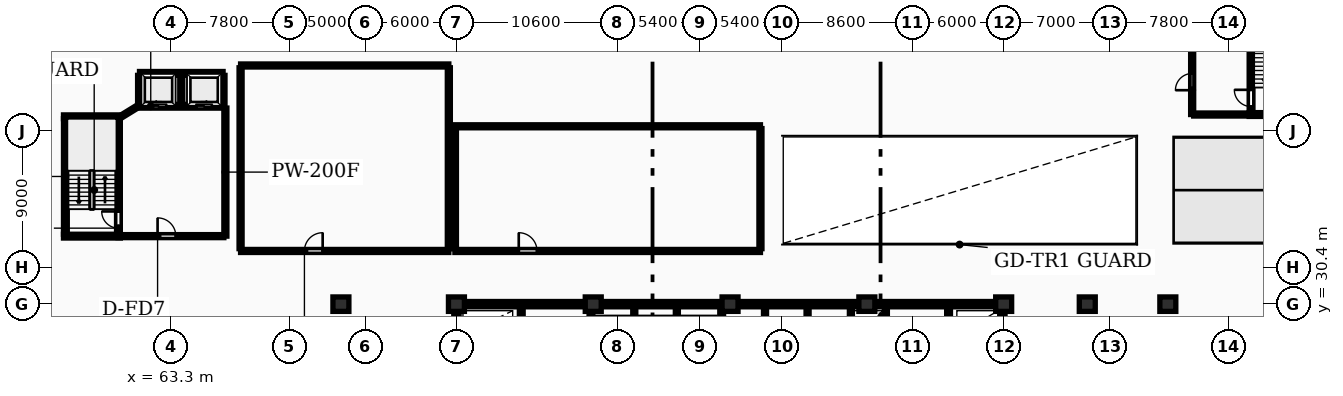
"""IFC4 building model, lengths in metres.
Left out: names, types, materials, properties, quantities, classifications, styles, units other than length and angle.
Written with IfcOpenShell. Run it as: python <this file> out.ifc"""

import sys

from ifc_helpers import new_model, si_unit, direction, frame, frame_2d, origin, origin_2d, place, context, subcontext, project, spatial, rectangle, extrude, element, fill, save


model = new_model("IFC4")
c1 = context("Model", 3, precision=1e-05, world=origin(), true_north=direction((0.0, 1.0)))
c2 = subcontext(c1, "Body", "Model", "MODEL_VIEW")
j1 = project(units=[si_unit("LENGTHUNIT", "METRE"), si_unit("PLANEANGLEUNIT", "RADIAN")], contexts=[c1])
p1 = place(None, origin())
s1 = spatial("IfcSite", under=j1, at=p1, CompositionType="ELEMENT")
p2 = place(p1, origin())
s2 = spatial("IfcBuilding", under=s1, at=p2, CompositionType="ELEMENT")
p3 = place(p2, frame((0.0, 0.0, -3.6)))
s3 = spatial("IfcBuildingStorey", under=s2, at=p3, CompositionType="ELEMENT", Elevation=-3.6)
for number, where, z_axis, x_axis in (
    (1, (74.5, 30.4, 0.0), (0.0, 0.0, 1.0), (1.0, 0.0, 0.0)),
    (2, (82.1, 30.4, 0.0), (0.0, 0.0, 1.0), (1.0, 0.0, 0.0)),
    (3, (91.1, 30.4, 0.0), (0.0, 0.0, 1.0), (1.0, 0.0, 0.0)),
    (4, (100.1, 30.4, 0.0), (0.0, 0.0, 1.0), (1.0, 0.0, 0.0)),
    (5, (109.1, 30.4, 0.0), (0.0, 0.0, 1.0), (1.0, 0.0, 0.0)),
    (6, (118.1, 30.4, 0.0), (0.0, 0.0, 1.0), (1.0, 0.0, 0.0)),
    (7, (123.6, 30.4, 0.0), (0.0, 0.0, 1.0), (1.0, 0.0, 0.0)),
    (8, (128.9, 30.4, 0.0), (0.0, 0.0, 1.0), (1.0, 0.0, 0.0)),
):
    element("IfcColumn", number, at=place(p3, frame(where, z_axis=z_axis, x_axis=x_axis)), inside=s3, PredefinedType="COLUMN", context=c2, shape_type="SweptSolid", body=[
        extrude(rectangle(XDim=1.05, YDim=0.95, at=origin_2d()), origin(), (0.0, 0.0, 1.0), 3.6),
    ])
p4 = place(p3, frame((81.925, 30.4, 0.0), z_axis=(0.0, 0.0, 1.0), x_axis=(1.0, 0.0, 0.0)))
e9 = element("IfcWall", 9, at=p4, inside=s3, PredefinedType="SHEAR", context=c2, shape_type="SweptSolid", body=[
    extrude(rectangle(XDim=36.265, YDim=0.35, at=frame_2d((18.132, 0.0))), origin(), (0.0, 0.0, 1.0), 3.6),
])
for number, where, z_axis, x_axis in (
    (10, (82.1, 18.575, 0.0), (0.0, 0.0, 1.0), (0.0, 1.0, 0.0)),
    (11, (118.015, 18.575, 0.0), (0.0, 0.0, 1.0), (0.0, 1.0, 0.0)),
):
    element("IfcWall", number, at=place(p3, frame(where, z_axis=z_axis, x_axis=x_axis)), inside=s3, PredefinedType="SHEAR", context=c2, shape_type="SweptSolid", body=[
        extrude(rectangle(XDim=11.65, YDim=0.35, at=frame_2d((5.825, 0.0))), origin(), (0.0, 0.0, 1.0), 3.6),
    ])
p5 = place(p3, frame((86.365, 18.6, 0.0), z_axis=(0.0, 0.0, 1.0), x_axis=(0.0, 1.0, 0.0)))
e12 = element("IfcWall", 12, at=p5, inside=s3, PredefinedType="SHEAR", context=c2, shape_type="SweptSolid", body=[
    extrude(rectangle(XDim=11.6, YDim=0.25, at=frame_2d((5.8, 0.0))), origin(), (0.0, 0.0, 1.0), 3.6),
])
p6 = place(p5, frame((0.45, 0.0, 0.0)))
e13 = element("IfcOpeningElement", 13, at=p6, cuts=e12, PredefinedType="OPENING", context=c2, shape_type="SweptSolid", body=[
    extrude(rectangle(XDim=0.85, YDim=2.05, at=frame_2d((0.425, 1.025))), frame((0.0, 0.135, 0.0), z_axis=(0.0, -1.0, 0.0), x_axis=(1.0, 0.0, 0.0)), (0.0, 0.0, 1.0), 0.27),
])
p7 = place(p5, frame((2.05, 0.0, 0.0)))
e14 = element("IfcOpeningElement", 14, at=p7, cuts=e12, PredefinedType="OPENING", context=c2, shape_type="SweptSolid", body=[
    extrude(rectangle(XDim=1.1, YDim=2.1, at=frame_2d((0.55, 1.05))), frame((0.0, 0.135, 0.0), z_axis=(0.0, -1.0, 0.0), x_axis=(1.0, 0.0, 0.0)), (0.0, 0.0, 1.0), 0.27),
])
p8 = place(p5, frame((9.95, 0.0, 0.0)))
e15 = element("IfcOpeningElement", 15, at=p8, cuts=e12, PredefinedType="OPENING", context=c2, shape_type="SweptSolid", body=[
    extrude(rectangle(XDim=0.85, YDim=2.05, at=frame_2d((0.425, 1.025))), frame((0.0, 0.135, 0.0), z_axis=(0.0, -1.0, 0.0), x_axis=(1.0, 0.0, 0.0)), (0.0, 0.0, 1.0), 0.27),
])
p9 = place(p3, frame((90.95, 18.6, 0.0), z_axis=(0.0, 0.0, 1.0), x_axis=(0.0, 1.0, 0.0)))
e16 = element("IfcWall", 16, at=p9, inside=s3, PredefinedType="SHEAR", context=c2, shape_type="SweptSolid", body=[
    extrude(rectangle(XDim=11.6, YDim=0.25, at=frame_2d((5.8, 0.0))), origin(), (0.0, 0.0, 1.0), 3.6),
])
p10 = place(p9, frame((4.6, 0.0, 0.0)))
e17 = element("IfcOpeningElement", 17, at=p10, cuts=e16, PredefinedType="OPENING", context=c2, shape_type="SweptSolid", body=[
    extrude(rectangle(XDim=1.1, YDim=2.1, at=frame_2d((0.55, 1.05))), frame((0.0, 0.135, 0.0), z_axis=(0.0, -1.0, 0.0), x_axis=(1.0, 0.0, 0.0)), (0.0, 0.0, 1.0), 0.27),
])
for number, where, z_axis, x_axis in (
    (18, (93.8, 27.38, 0.0), (0.0, 0.0, 1.0), (0.0, 1.0, 0.0)),
    (19, (96.6, 27.38, 0.0), (0.0, 0.0, 1.0), (0.0, 1.0, 0.0)),
):
    element("IfcWall", number, at=place(p3, frame(where, z_axis=z_axis, x_axis=x_axis)), inside=s3, PredefinedType="PARTITIONING", context=c2, shape_type="SweptSolid", body=[
        extrude(rectangle(XDim=2.82, YDim=0.2, at=frame_2d((1.41, 0.0))), origin(), (0.0, 0.0, 1.0), 3.3),
    ])
p11 = place(p3, frame((99.55, 27.25, 0.0), z_axis=(0.0, 0.0, 1.0), x_axis=(0.0, 1.0, 0.0)))
e20 = element("IfcWall", 20, at=p11, inside=s3, PredefinedType="SHEAR", context=c2, shape_type="SweptSolid", body=[
    extrude(rectangle(XDim=2.95, YDim=0.25, at=frame_2d((1.475, 0.0))), origin(), (0.0, 0.0, 1.0), 3.6),
])
for number, where, z_axis, x_axis in (
    (21, (102.4, 27.38, 0.0), (0.0, 0.0, 1.0), (0.0, 1.0, 0.0)),
    (22, (105.2, 27.38, 0.0), (0.0, 0.0, 1.0), (0.0, 1.0, 0.0)),
    (23, (108.05, 27.38, 0.0), (0.0, 0.0, 1.0), (0.0, 1.0, 0.0)),
):
    element("IfcWall", number, at=place(p3, frame(where, z_axis=z_axis, x_axis=x_axis)), inside=s3, PredefinedType="PARTITIONING", context=c2, shape_type="SweptSolid", body=[
        extrude(rectangle(XDim=2.82, YDim=0.2, at=frame_2d((1.41, 0.0))), origin(), (0.0, 0.0, 1.0), 3.3),
    ])
p12 = place(p3, frame((110.35, 18.6, 0.0), z_axis=(0.0, 0.0, 1.0), x_axis=(0.0, 1.0, 0.0)))
e24 = element("IfcWall", 24, at=p12, inside=s3, PredefinedType="PARTITIONING", context=c2, shape_type="SweptSolid", body=[
    extrude(rectangle(XDim=11.6, YDim=0.2, at=frame_2d((5.8, 0.0))), origin(), (0.0, 0.0, 1.0), 3.3),
])
p13 = place(p12, frame((5.2, 0.0, 0.0)))
e25 = element("IfcOpeningElement", 25, at=p13, cuts=e24, PredefinedType="OPENING", context=c2, shape_type="SweptSolid", body=[
    extrude(rectangle(XDim=1.1, YDim=2.15, at=frame_2d((0.55, 1.075))), frame((0.0, 0.11, 0.0), z_axis=(0.0, -1.0, 0.0), x_axis=(1.0, 0.0, 0.0)), (0.0, 0.0, 1.0), 0.22),
])
p14 = place(p3, frame((114.475, 18.6, 0.0), z_axis=(0.0, 0.0, 1.0), x_axis=(0.0, 1.0, 0.0)))
e26 = element("IfcWall", 26, at=p14, inside=s3, PredefinedType="SHEAR", context=c2, shape_type="SweptSolid", body=[
    extrude(rectangle(XDim=11.6, YDim=0.25, at=frame_2d((5.8, 0.0))), origin(), (0.0, 0.0, 1.0), 3.6),
])
p15 = place(p14, frame((0.45, 0.0, 0.0)))
e27 = element("IfcOpeningElement", 27, at=p15, cuts=e26, PredefinedType="OPENING", context=c2, shape_type="SweptSolid", body=[
    extrude(rectangle(XDim=0.85, YDim=2.05, at=frame_2d((0.425, 1.025))), frame((0.0, 0.135, 0.0), z_axis=(0.0, -1.0, 0.0), x_axis=(1.0, 0.0, 0.0)), (0.0, 0.0, 1.0), 0.27),
])
p16 = place(p14, frame((2.05, 0.0, 0.0)))
e28 = element("IfcOpeningElement", 28, at=p16, cuts=e26, PredefinedType="OPENING", context=c2, shape_type="SweptSolid", body=[
    extrude(rectangle(XDim=1.1, YDim=2.1, at=frame_2d((0.55, 1.05))), frame((0.0, 0.135, 0.0), z_axis=(0.0, -1.0, 0.0), x_axis=(1.0, 0.0, 0.0)), (0.0, 0.0, 1.0), 0.27),
])
p17 = place(p14, frame((9.95, 0.0, 0.0)))
e29 = element("IfcOpeningElement", 29, at=p17, cuts=e26, PredefinedType="OPENING", context=c2, shape_type="SweptSolid", body=[
    extrude(rectangle(XDim=0.85, YDim=2.05, at=frame_2d((0.425, 1.025))), frame((0.0, 0.135, 0.0), z_axis=(0.0, -1.0, 0.0), x_axis=(1.0, 0.0, 0.0)), (0.0, 0.0, 1.0), 0.27),
])
p18 = place(p3, frame((56.375, 35.0, 0.0), z_axis=(0.0, 0.0, 1.0), x_axis=(0.0, 1.0, 0.0)))
e30 = element("IfcWall", 30, at=p18, inside=s3, PredefinedType="SHEAR", context=c2, shape_type="SweptSolid", body=[
    extrude(rectangle(XDim=7.6, YDim=0.25, at=frame_2d((3.8, 0.0))), origin(), (0.0, 0.0, 1.0), 3.6),
])
for number, where, z_axis, x_axis in (
    (31, (56.25, 42.725, 0.0), (0.0, 0.0, 1.0), (1.0, 0.0, 0.0)),
    (32, (56.25, 34.875, 0.0), (0.0, 0.0, 1.0), (1.0, 0.0, 0.0)),
):
    element("IfcWall", number, at=place(p3, frame(where, z_axis=z_axis, x_axis=x_axis)), inside=s3, PredefinedType="SHEAR", context=c2, shape_type="SweptSolid", body=[
        extrude(rectangle(XDim=3.74, YDim=0.25, at=frame_2d((1.87, 0.0))), origin(), (0.0, 0.0, 1.0), 3.6),
    ])
p19 = place(p3, frame((59.865, 35.0, 0.0), z_axis=(0.0, 0.0, 1.0), x_axis=(0.0, 1.0, 0.0)))
e33 = element("IfcWall", 33, at=p19, inside=s3, PredefinedType="SHEAR", context=c2, shape_type="SweptSolid", body=[
    extrude(rectangle(XDim=7.6, YDim=0.25, at=frame_2d((3.8, 0.0))), origin(), (0.0, 0.0, 1.0), 3.6),
])
p20 = place(p19, frame((0.4, 0.0, 0.0)))
e34 = element("IfcOpeningElement", 34, at=p20, cuts=e33, PredefinedType="OPENING", context=c2, shape_type="SweptSolid", body=[
    extrude(rectangle(XDim=1.1, YDim=2.1, at=frame_2d((0.55, 1.05))), frame((0.0, 0.135, 0.0), z_axis=(0.0, -1.0, 0.0), x_axis=(1.0, 0.0, 0.0)), (0.0, 0.0, 1.0), 0.27),
])
p21 = place(p3, frame((61.25, 43.42, 0.0), z_axis=(0.0, 0.0, 1.0), x_axis=(1.0, 0.0, 0.0)))
e35 = element("IfcWall", 35, at=p21, inside=s3, PredefinedType="SHEAR", context=c2, shape_type="SweptSolid", body=[
    extrude(rectangle(XDim=5.5, YDim=0.25, at=frame_2d((2.75, 0.0))), origin(), (0.0, 0.0, 1.0), 3.6),
])
p22 = place(p21, frame((0.74, 0.0, 0.0)))
e36 = element("IfcOpeningElement", 36, at=p22, cuts=e35, PredefinedType="OPENING", context=c2, shape_type="SweptSolid", body=[
    extrude(rectangle(XDim=1.02, YDim=2.12, at=frame_2d((0.51, 1.06))), frame((0.0, 0.135, 0.0), z_axis=(0.0, -1.0, 0.0), x_axis=(1.0, 0.0, 0.0)), (0.0, 0.0, 1.0), 0.27),
])
p23 = place(p21, frame((3.74, 0.0, 0.0)))
e37 = element("IfcOpeningElement", 37, at=p23, cuts=e35, PredefinedType="OPENING", context=c2, shape_type="SweptSolid", body=[
    extrude(rectangle(XDim=1.02, YDim=2.12, at=frame_2d((0.51, 1.06))), frame((0.0, 0.135, 0.0), z_axis=(0.0, -1.0, 0.0), x_axis=(1.0, 0.0, 0.0)), (0.0, 0.0, 1.0), 0.27),
])
p24 = place(p3, frame((61.25, 45.58, 0.0), z_axis=(0.0, 0.0, 1.0), x_axis=(1.0, 0.0, 0.0)))
e38 = element("IfcWall", 38, at=p24, inside=s3, PredefinedType="SHEAR", context=c2, shape_type="SweptSolid", body=[
    extrude(rectangle(XDim=5.5, YDim=0.25, at=frame_2d((2.75, 0.0))), origin(), (0.0, 0.0, 1.0), 3.6),
])
for number, where, z_axis, x_axis in (
    (39, (61.25, 43.55, 0.0), (0.0, 0.0, 1.0), (0.0, 1.0, 0.0)),
    (40, (66.75, 43.55, 0.0), (0.0, 0.0, 1.0), (0.0, 1.0, 0.0)),
):
    element("IfcWall", number, at=place(p3, frame(where, z_axis=z_axis, x_axis=x_axis)), inside=s3, PredefinedType="SHEAR", context=c2, shape_type="SweptSolid", body=[
        extrude(rectangle(XDim=1.9, YDim=0.25, at=frame_2d((0.95, 0.0))), origin(), (0.0, 0.0, 1.0), 3.6),
    ])
p25 = place(p3, frame((64.0, 43.55, 0.0), z_axis=(0.0, 0.0, 1.0), x_axis=(0.0, 1.0, 0.0)))
e41 = element("IfcWall", 41, at=p25, inside=s3, PredefinedType="PARTITIONING", context=c2, shape_type="SweptSolid", body=[
    extrude(rectangle(XDim=1.9, YDim=0.2, at=frame_2d((0.95, 0.0))), origin(), (0.0, 0.0, 1.0), 3.3),
])
p26 = place(p3, frame((59.84, 34.875, 0.0), z_axis=(0.0, 0.0, 1.0), x_axis=(1.0, 0.0, 0.0)))
e42 = element("IfcWall", 42, at=p26, inside=s3, PredefinedType="PARTITIONING", context=c2, shape_type="SweptSolid", body=[
    extrude(rectangle(XDim=6.96, YDim=0.2, at=frame_2d((3.48, 0.0))), origin(), (0.0, 0.0, 1.0), 3.3),
])
p27 = place(p26, frame((2.6, 0.0, 0.0)))
e43 = element("IfcOpeningElement", 43, at=p27, cuts=e42, PredefinedType="OPENING", context=c2, shape_type="SweptSolid", body=[
    extrude(rectangle(XDim=1.2, YDim=2.18, at=frame_2d((0.6, 1.09))), frame((0.0, 0.11, 0.0), z_axis=(0.0, -1.0, 0.0), x_axis=(1.0, 0.0, 0.0)), (0.0, 0.0, 1.0), 0.22),
])
p28 = place(p3, frame((66.9, 34.875, 0.0), z_axis=(0.0, 0.0, 1.0), x_axis=(0.0, 1.0, 0.0)))
e44 = element("IfcWall", 44, at=p28, inside=s3, PredefinedType="PARTITIONING", context=c2, shape_type="SweptSolid", body=[
    extrude(rectangle(XDim=8.425, YDim=0.2, at=frame_2d((4.212, 0.0))), origin(), (0.0, 0.0, 1.0), 3.3),
])
p29 = place(p3, frame((60.02, 42.725, 0.0), z_axis=(0.0, 0.0, 1.0), x_axis=(0.851822584555, 0.523830396638, 0.0)))
e45 = element("IfcWall", 45, at=p29, inside=s3, PredefinedType="PARTITIONING", context=c2, shape_type="SweptSolid", body=[
    extrude(rectangle(XDim=1.326, YDim=0.2, at=frame_2d((0.663, 0.0))), origin(), (0.0, 0.0, 1.0), 3.3),
])
p30 = place(p3, frame((134.375, 43.0, 0.0), z_axis=(0.0, 0.0, 1.0), x_axis=(0.0, 1.0, 0.0)))
e46 = element("IfcWall", 46, at=p30, inside=s3, PredefinedType="SHEAR", context=c2, shape_type="SweptSolid", body=[
    extrude(rectangle(XDim=7.6, YDim=0.25, at=frame_2d((3.8, 0.0))), origin(), (0.0, 0.0, 1.0), 3.6),
])
p31 = place(p30, frame((0.4, 0.0, 0.0)))
e47 = element("IfcOpeningElement", 47, at=p31, cuts=e46, PredefinedType="OPENING", context=c2, shape_type="SweptSolid", body=[
    extrude(rectangle(XDim=1.1, YDim=2.1, at=frame_2d((0.55, 1.05))), frame((0.0, 0.135, 0.0), z_axis=(0.0, -1.0, 0.0), x_axis=(1.0, 0.0, 0.0)), (0.0, 0.0, 1.0), 0.27),
])
p32 = place(p3, frame((134.25, 42.875, 0.0), z_axis=(0.0, 0.0, 1.0), x_axis=(1.0, 0.0, 0.0)))
e48 = element("IfcWall", 48, at=p32, inside=s3, PredefinedType="SHEAR", context=c2, shape_type="SweptSolid", body=[
    extrude(rectangle(XDim=3.74, YDim=0.25, at=frame_2d((1.87, 0.0))), origin(), (0.0, 0.0, 1.0), 3.6),
])
p33 = place(p3, frame((130.5, 42.875, 0.0), z_axis=(0.0, 0.0, 1.0), x_axis=(0.0, 1.0, 0.0)))
e49 = element("IfcWall", 49, at=p33, inside=s3, PredefinedType="PARTITIONING", context=c2, shape_type="SweptSolid", body=[
    extrude(rectangle(XDim=4.825, YDim=0.2, at=frame_2d((2.413, 0.0))), origin(), (0.0, 0.0, 1.0), 3.3),
])
p34 = place(p33, frame((1.6, 0.0, 0.0)))
e50 = element("IfcOpeningElement", 50, at=p34, cuts=e49, PredefinedType="OPENING", context=c2, shape_type="SweptSolid", body=[
    extrude(rectangle(XDim=1.1, YDim=2.15, at=frame_2d((0.55, 1.075))), frame((0.0, 0.11, 0.0), z_axis=(0.0, -1.0, 0.0), x_axis=(1.0, 0.0, 0.0)), (0.0, 0.0, 1.0), 0.22),
])
p35 = place(p3, frame((130.6, 42.875, 0.0), z_axis=(0.0, 0.0, 1.0), x_axis=(1.0, 0.0, 0.0)))
e51 = element("IfcWall", 51, at=p35, inside=s3, PredefinedType="PARTITIONING", context=c2, shape_type="SweptSolid", body=[
    extrude(rectangle(XDim=3.65, YDim=0.2, at=frame_2d((1.825, 0.0))), origin(), (0.0, 0.0, 1.0), 3.3),
])
p36 = place(p3, frame((67.9, 33.9, 0.0), z_axis=(0.0, 0.0, 1.0), x_axis=(1.0, 0.0, 0.0)))
e52 = element("IfcWall", 52, at=p36, inside=s3, PredefinedType="PARTITIONING", context=c2, shape_type="SweptSolid", body=[
    extrude(rectangle(XDim=13.7, YDim=0.2, at=frame_2d((6.85, 0.0))), origin(), (0.0, 0.0, 1.0), 3.3),
])
p37 = place(p36, frame((4.2, 0.0, 0.0)))
e53 = element("IfcOpeningElement", 53, at=p37, cuts=e52, PredefinedType="OPENING", context=c2, shape_type="SweptSolid", body=[
    extrude(rectangle(XDim=1.2, YDim=2.15, at=frame_2d((0.6, 1.075))), frame((0.0, 0.11, 0.0), z_axis=(0.0, -1.0, 0.0), x_axis=(1.0, 0.0, 0.0)), (0.0, 0.0, 1.0), 0.22),
])
p38 = place(p3, frame((67.9, 46.1, 0.0), z_axis=(0.0, 0.0, 1.0), x_axis=(1.0, 0.0, 0.0)))
e54 = element("IfcWall", 54, at=p38, inside=s3, PredefinedType="PARTITIONING", context=c2, shape_type="SweptSolid", body=[
    extrude(rectangle(XDim=13.7, YDim=0.2, at=frame_2d((6.85, 0.0))), origin(), (0.0, 0.0, 1.0), 3.3),
])
for number, where, z_axis, x_axis in (
    (55, (67.9, 34.05, 0.0), (0.0, 0.0, 1.0), (0.0, 1.0, 0.0)),
    (56, (81.6, 34.05, 0.0), (0.0, 0.0, 1.0), (0.0, 1.0, 0.0)),
):
    element("IfcWall", number, at=place(p3, frame(where, z_axis=z_axis, x_axis=x_axis)), inside=s3, PredefinedType="PARTITIONING", context=c2, shape_type="SweptSolid", body=[
        extrude(rectangle(XDim=11.9, YDim=0.2, at=frame_2d((5.95, 0.0))), origin(), (0.0, 0.0, 1.0), 3.3),
    ])
p39 = place(p3, frame((82.0, 33.9, 0.0), z_axis=(0.0, 0.0, 1.0), x_axis=(1.0, 0.0, 0.0)))
e57 = element("IfcWall", 57, at=p39, inside=s3, PredefinedType="PARTITIONING", context=c2, shape_type="SweptSolid", body=[
    extrude(rectangle(XDim=20.1, YDim=0.2, at=frame_2d((10.05, 0.0))), origin(), (0.0, 0.0, 1.0), 3.3),
])
p40 = place(p39, frame((4.2, 0.0, 0.0)))
e58 = element("IfcOpeningElement", 58, at=p40, cuts=e57, PredefinedType="OPENING", context=c2, shape_type="SweptSolid", body=[
    extrude(rectangle(XDim=1.2, YDim=2.15, at=frame_2d((0.6, 1.075))), frame((0.0, 0.11, 0.0), z_axis=(0.0, -1.0, 0.0), x_axis=(1.0, 0.0, 0.0)), (0.0, 0.0, 1.0), 0.22),
])
p41 = place(p3, frame((82.0, 42.1, 0.0), z_axis=(0.0, 0.0, 1.0), x_axis=(1.0, 0.0, 0.0)))
e59 = element("IfcWall", 59, at=p41, inside=s3, PredefinedType="PARTITIONING", context=c2, shape_type="SweptSolid", body=[
    extrude(rectangle(XDim=20.1, YDim=0.2, at=frame_2d((10.05, 0.0))), origin(), (0.0, 0.0, 1.0), 3.3),
])
for number, where, z_axis, x_axis in (
    (60, (82.0, 34.05, 0.0), (0.0, 0.0, 1.0), (0.0, 1.0, 0.0)),
    (61, (102.1, 34.05, 0.0), (0.0, 0.0, 1.0), (0.0, 1.0, 0.0)),
):
    element("IfcWall", number, at=place(p3, frame(where, z_axis=z_axis, x_axis=x_axis)), inside=s3, PredefinedType="PARTITIONING", context=c2, shape_type="SweptSolid", body=[
        extrude(rectangle(XDim=7.9, YDim=0.2, at=frame_2d((3.95, 0.0))), origin(), (0.0, 0.0, 1.0), 3.3),
    ])
p42 = place(p20, origin())
e62 = element("IfcDoor", 62, at=p42, inside=s3, OperationType="SINGLE_SWING_RIGHT", PredefinedType="DOOR", context=c2, shape_type="SweptSolid", body=[
    extrude(rectangle(XDim=1.1, YDim=2.1, at=frame_2d((0.55, 1.05))), frame((0.0, 0.025, 0.0), z_axis=(0.0, -1.0, 0.0), x_axis=(1.0, 0.0, 0.0)), (0.0, 0.0, 1.0), 0.05),
])
fill(e34, e62)
p43 = place(p22, origin())
e63 = element("IfcDoor", 63, at=p43, inside=s3, OperationType="SLIDING_TO_LEFT", PredefinedType="DOOR", context=c2, shape_type="SweptSolid", body=[
    extrude(rectangle(XDim=1.02, YDim=2.12, at=frame_2d((0.51, 1.06))), frame((0.0, 0.025, 0.0), z_axis=(0.0, -1.0, 0.0), x_axis=(1.0, 0.0, 0.0)), (0.0, 0.0, 1.0), 0.05),
])
fill(e36, e63)
p44 = place(p23, origin())
e64 = element("IfcDoor", 64, at=p44, inside=s3, OperationType="SLIDING_TO_RIGHT", PredefinedType="DOOR", context=c2, shape_type="SweptSolid", body=[
    extrude(rectangle(XDim=1.02, YDim=2.12, at=frame_2d((0.51, 1.06))), frame((0.0, 0.025, 0.0), z_axis=(0.0, -1.0, 0.0), x_axis=(1.0, 0.0, 0.0)), (0.0, 0.0, 1.0), 0.05),
])
fill(e37, e64)
p45 = place(p27, origin())
e65 = element("IfcDoor", 65, at=p45, inside=s3, OperationType="SINGLE_SWING_LEFT", PredefinedType="DOOR", context=c2, shape_type="SweptSolid", body=[
    extrude(rectangle(XDim=1.2, YDim=2.18, at=frame_2d((0.6, 1.09))), frame((0.0, 0.025, 0.0), z_axis=(0.0, -1.0, 0.0), x_axis=(1.0, 0.0, 0.0)), (0.0, 0.0, 1.0), 0.05),
])
fill(e43, e65)
p46 = place(p31, origin())
e66 = element("IfcDoor", 66, at=p46, inside=s3, OperationType="SINGLE_SWING_RIGHT", PredefinedType="DOOR", context=c2, shape_type="SweptSolid", body=[
    extrude(rectangle(XDim=1.1, YDim=2.1, at=frame_2d((0.55, 1.05))), frame((0.0, 0.025, 0.0), z_axis=(0.0, -1.0, 0.0), x_axis=(1.0, 0.0, 0.0)), (0.0, 0.0, 1.0), 0.05),
])
fill(e47, e66)
p47 = place(p34, origin())
e67 = element("IfcDoor", 67, at=p47, inside=s3, OperationType="SINGLE_SWING_LEFT", PredefinedType="DOOR", context=c2, shape_type="SweptSolid", body=[
    extrude(rectangle(XDim=1.1, YDim=2.15, at=frame_2d((0.55, 1.075))), frame((0.0, 0.025, 0.0), z_axis=(0.0, -1.0, 0.0), x_axis=(1.0, 0.0, 0.0)), (0.0, 0.0, 1.0), 0.05),
])
fill(e50, e67)
p48 = place(p37, origin())
e68 = element("IfcDoor", 68, at=p48, inside=s3, OperationType="SINGLE_SWING_RIGHT", PredefinedType="DOOR", context=c2, shape_type="SweptSolid", body=[
    extrude(rectangle(XDim=1.2, YDim=2.15, at=frame_2d((0.6, 1.075))), frame((0.0, 0.025, 0.0), z_axis=(0.0, -1.0, 0.0), x_axis=(1.0, 0.0, 0.0)), (0.0, 0.0, 1.0), 0.05),
])
fill(e53, e68)
p49 = place(p40, origin())
e69 = element("IfcDoor", 69, at=p49, inside=s3, OperationType="SINGLE_SWING_LEFT", PredefinedType="DOOR", context=c2, shape_type="SweptSolid", body=[
    extrude(rectangle(XDim=1.2, YDim=2.15, at=frame_2d((0.6, 1.075))), frame((0.0, 0.025, 0.0), z_axis=(0.0, -1.0, 0.0), x_axis=(1.0, 0.0, 0.0)), (0.0, 0.0, 1.0), 0.05),
])
fill(e58, e69)
save(model, sys.argv[1])
